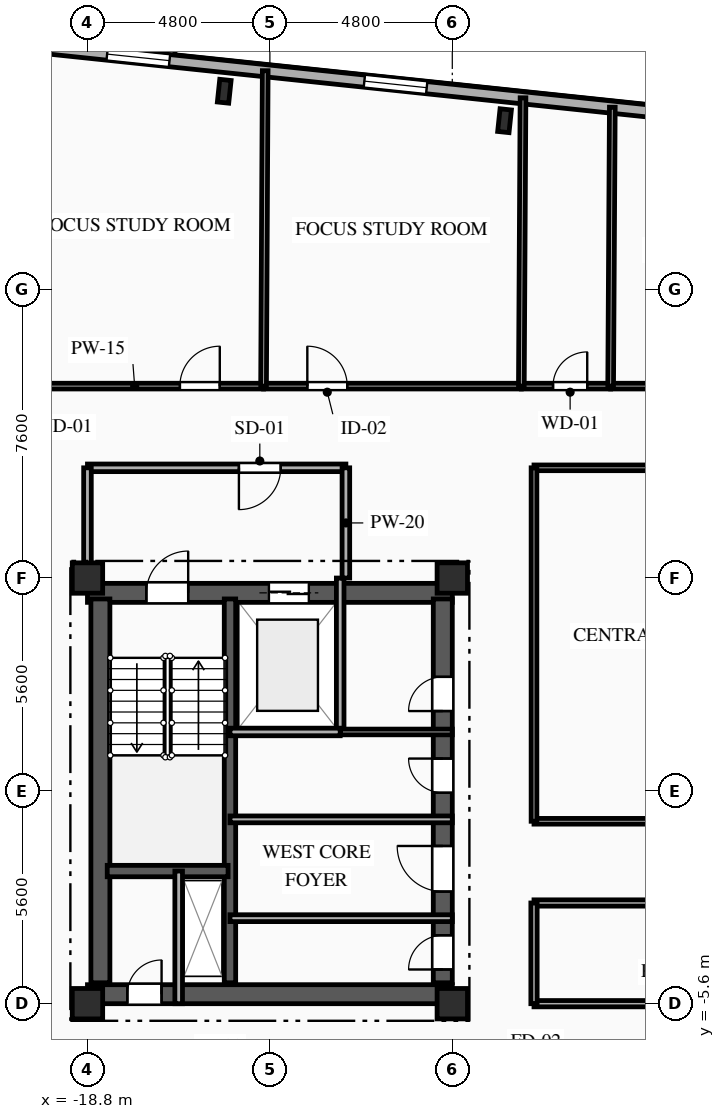
"""IFC4 building model, lengths in metres.
Left out: names, types, materials, properties, quantities, classifications, styles, units other than length and angle.
Written with IfcOpenShell. Run it as: python <this file> out.ifc"""

import sys

from ifc_helpers import new_model, si_unit, direction, frame, frame_2d, origin, origin_2d, place, context, subcontext, project, spatial, rectangle, i_section, extrude, element, fill, save


model = new_model("IFC4")
c1 = context("Model", 3, precision=1e-05, world=origin(), true_north=direction((0.0, 1.0)))
c2 = subcontext(c1, "Body", "Model", "MODEL_VIEW")
j1 = project(units=[si_unit("LENGTHUNIT", "METRE"), si_unit("PLANEANGLEUNIT", "RADIAN")], contexts=[c1])
p1 = place(None, origin())
s1 = spatial("IfcSite", under=j1, at=p1, CompositionType="ELEMENT")
p2 = place(p1, origin())
s2 = spatial("IfcBuilding", under=s1, at=p2, CompositionType="ELEMENT")
p3 = place(p2, frame((0.0, 0.0, 219.85)))
s3 = spatial("IfcBuildingStorey", under=s2, at=p3, CompositionType="ELEMENT", Elevation=219.85)
for number, where, z_axis, x_axis in (
    (1, (-18.8, -5.6, 0.0), (0.0, 0.0, 1.0), (1.0, 0.0, 0.0)),
    (2, (-18.8, 5.6, 0.0), (0.0, 0.0, 1.0), (1.0, 0.0, 0.0)),
    (3, (-9.2, -5.6, 0.0), (0.0, 0.0, 1.0), (1.0, 0.0, 0.0)),
    (4, (-9.2, 5.6, 0.0), (0.0, 0.0, 1.0), (1.0, 0.0, 0.0)),
):
    element("IfcColumn", number, at=place(p3, frame(where, z_axis=z_axis, x_axis=x_axis)), inside=s3, PredefinedType="COLUMN", context=c2, shape_type="SweptSolid", body=[
        extrude(rectangle(XDim=0.8, YDim=0.8, at=origin_2d()), origin(), (0.0, 0.0, 1.0), 3.35),
    ])
for number, where, z_axis, x_axis in (
    (5, (-7.825, 17.634, 0.0), (0.0, 0.0, 1.0), (0.995, -0.105, 0.0)),
    (6, (-15.201, 18.409, 0.0), (0.0, 0.0, 1.0), (0.995, -0.105, 0.0)),
):
    element("IfcColumn", number, at=place(p3, frame(where, z_axis=z_axis, x_axis=x_axis)), inside=s3, PredefinedType="COLUMN", context=c2, shape_type="SweptSolid", body=[
        extrude(i_section(OverallWidth=0.3, OverallDepth=0.6, WebThickness=0.015, FlangeThickness=0.03, FilletRadius=0.027, at=origin_2d()), origin(), (0.0, 0.0, 1.0), 3.35),
    ])
p4 = place(p3, frame((-23.156, 19.898, 0.0), z_axis=(0.0, 0.0, 1.0), x_axis=(0.994522001802, -0.104527450613, 0.0)))
e7 = element("IfcWall", 7, at=p4, inside=s3, PredefinedType="SOLIDWALL", context=c2, shape_type="SweptSolid", body=[
    extrude(rectangle(XDim=45.8, YDim=0.32, at=frame_2d((22.9, 0.0))), origin(), (0.0, 0.0, 1.0), 3.0),
])
p5 = place(p4, frame((4.9, 0.0, 0.85)))
e8 = element("IfcOpeningElement", 8, at=p5, cuts=e7, PredefinedType="OPENING", context=c2, shape_type="SweptSolid", body=[
    extrude(rectangle(XDim=1.65, YDim=1.85, at=frame_2d((0.825, 0.925))), frame((0.0, 0.17, 0.0), z_axis=(0.0, -1.0, 0.0), x_axis=(1.0, 0.0, 0.0)), (0.0, 0.0, 1.0), 0.34),
])
p6 = place(p4, frame((11.706, 0.0, 0.85)))
e9 = element("IfcOpeningElement", 9, at=p6, cuts=e7, PredefinedType="OPENING", context=c2, shape_type="SweptSolid", body=[
    extrude(rectangle(XDim=1.65, YDim=1.85, at=frame_2d((0.825, 0.925))), frame((0.0, 0.17, 0.0), z_axis=(0.0, -1.0, 0.0), x_axis=(1.0, 0.0, 0.0)), (0.0, 0.0, 1.0), 0.34),
])
p7 = place(p4, frame((23.431, 0.0, 0.85)))
e10 = element("IfcOpeningElement", 10, at=p7, cuts=e7, PredefinedType="OPENING", context=c2, shape_type="SweptSolid", body=[
    extrude(rectangle(XDim=1.5, YDim=1.85, at=frame_2d((0.75, 0.925))), frame((0.0, 0.17, 0.0), z_axis=(0.0, -1.0, 0.0), x_axis=(1.0, 0.0, 0.0)), (0.0, 0.0, 1.0), 0.34),
])
p8 = place(p4, frame((34.628, 0.0, 0.85)))
e11 = element("IfcOpeningElement", 11, at=p8, cuts=e7, PredefinedType="OPENING", context=c2, shape_type="SweptSolid", body=[
    extrude(rectangle(XDim=1.65, YDim=1.85, at=frame_2d((0.825, 0.925))), frame((0.0, 0.17, 0.0), z_axis=(0.0, -1.0, 0.0), x_axis=(1.0, 0.0, 0.0)), (0.0, 0.0, 1.0), 0.34),
])
p9 = place(p3, frame((-18.8, 5.21, 0.0), z_axis=(0.0, 0.0, 1.0), x_axis=(1.0, 0.0, 0.0)))
e12 = element("IfcWall", 12, at=p9, inside=s3, PredefinedType="SHEAR", context=c2, shape_type="SweptSolid", body=[
    extrude(rectangle(XDim=9.6, YDim=0.5, at=frame_2d((4.8, 0.0))), origin(), (0.0, 0.0, 1.0), 3.0),
])
p10 = place(p9, frame((1.55, 0.0, 0.0)))
e13 = element("IfcOpeningElement", 13, at=p10, cuts=e12, PredefinedType="OPENING", context=c2, shape_type="SweptSolid", body=[
    extrude(rectangle(XDim=1.1, YDim=2.15, at=frame_2d((0.55, 1.075))), frame((0.0, 0.26, 0.0), z_axis=(0.0, -1.0, 0.0), x_axis=(1.0, 0.0, 0.0)), (0.0, 0.0, 1.0), 0.52),
])
p11 = place(p9, frame((4.775, 0.0, 0.0)))
e14 = element("IfcOpeningElement", 14, at=p11, cuts=e12, PredefinedType="OPENING", context=c2, shape_type="SweptSolid", body=[
    extrude(rectangle(XDim=1.05, YDim=2.1, at=frame_2d((0.525, 1.05))), frame((0.0, 0.26, 0.0), z_axis=(0.0, -1.0, 0.0), x_axis=(1.0, 0.0, 0.0)), (0.0, 0.0, 1.0), 0.52),
])
p12 = place(p3, frame((-18.8, -5.35, 0.0), z_axis=(0.0, 0.0, 1.0), x_axis=(1.0, 0.0, 0.0)))
e15 = element("IfcWall", 15, at=p12, inside=s3, PredefinedType="SHEAR", context=c2, shape_type="SweptSolid", body=[
    extrude(rectangle(XDim=9.6, YDim=0.5, at=frame_2d((4.8, 0.0))), origin(), (0.0, 0.0, 1.0), 3.0),
])
p13 = place(p12, frame((1.05, 0.0, 0.0)))
e16 = element("IfcOpeningElement", 16, at=p13, cuts=e15, PredefinedType="OPENING", context=c2, shape_type="SweptSolid", body=[
    extrude(rectangle(XDim=0.9, YDim=2.1, at=frame_2d((0.45, 1.05))), frame((0.0, 0.26, 0.0), z_axis=(0.0, -1.0, 0.0), x_axis=(1.0, 0.0, 0.0)), (0.0, 0.0, 1.0), 0.52),
])
p14 = place(p3, frame((-18.46, -5.05, 0.0), z_axis=(0.0, 0.0, 1.0), x_axis=(0.0, 1.0, 0.0)))
e17 = element("IfcWall", 17, at=p14, inside=s3, PredefinedType="SHEAR", context=c2, shape_type="SweptSolid", body=[
    extrude(rectangle(XDim=10.1, YDim=0.5, at=frame_2d((5.05, 0.0))), origin(), (0.0, 0.0, 1.0), 3.0),
])
p15 = place(p3, frame((-9.45, -5.05, 0.0), z_axis=(0.0, 0.0, 1.0), x_axis=(0.0, 1.0, 0.0)))
e18 = element("IfcWall", 18, at=p15, inside=s3, PredefinedType="SHEAR", context=c2, shape_type="SweptSolid", body=[
    extrude(rectangle(XDim=10.1, YDim=0.5, at=frame_2d((5.05, 0.0))), origin(), (0.0, 0.0, 1.0), 3.0),
])
p16 = place(p15, frame((7.15, 0.0, 0.0)))
e19 = element("IfcOpeningElement", 19, at=p16, cuts=e18, PredefinedType="OPENING", context=c2, shape_type="SweptSolid", body=[
    extrude(rectangle(XDim=0.9, YDim=2.1, at=frame_2d((0.45, 1.05))), frame((0.0, 0.26, 0.0), z_axis=(0.0, -1.0, 0.0), x_axis=(1.0, 0.0, 0.0)), (0.0, 0.0, 1.0), 0.52),
])
p17 = place(p15, frame((2.4, 0.0, 0.0)))
e20 = element("IfcOpeningElement", 20, at=p17, cuts=e18, PredefinedType="OPENING", context=c2, shape_type="SweptSolid", body=[
    extrude(rectangle(XDim=1.2, YDim=2.15, at=frame_2d((0.6, 1.075))), frame((0.0, 0.26, 0.0), z_axis=(0.0, -1.0, 0.0), x_axis=(1.0, 0.0, 0.0)), (0.0, 0.0, 1.0), 0.52),
])
p18 = place(p15, frame((0.35, 0.0, 0.0)))
e21 = element("IfcOpeningElement", 21, at=p18, cuts=e18, PredefinedType="OPENING", context=c2, shape_type="SweptSolid", body=[
    extrude(rectangle(XDim=0.9, YDim=2.1, at=frame_2d((0.45, 1.05))), frame((0.0, 0.26, 0.0), z_axis=(0.0, -1.0, 0.0), x_axis=(1.0, 0.0, 0.0)), (0.0, 0.0, 1.0), 0.52),
])
p19 = place(p15, frame((5.0, 0.0, 0.0)))
e22 = element("IfcOpeningElement", 22, at=p19, cuts=e18, PredefinedType="OPENING", context=c2, shape_type="SweptSolid", body=[
    extrude(rectangle(XDim=0.9, YDim=2.1, at=frame_2d((0.45, 1.05))), frame((0.0, 0.26, 0.0), z_axis=(0.0, -1.0, 0.0), x_axis=(1.0, 0.0, 0.0)), (0.0, 0.0, 1.0), 0.52),
])
p20 = place(p3, frame((-15.05, -5.05, 0.0), z_axis=(0.0, 0.0, 1.0), x_axis=(0.0, 1.0, 0.0)))
e23 = element("IfcWall", 23, at=p20, inside=s3, PredefinedType="SHEAR", context=c2, shape_type="SweptSolid", body=[
    extrude(rectangle(XDim=10.1, YDim=0.3, at=frame_2d((5.05, 0.0))), origin(), (0.0, 0.0, 1.0), 3.0),
])
p21 = place(p3, frame((-18.28, -2.11, 0.0), z_axis=(0.0, 0.0, 1.0), x_axis=(1.0, 0.0, 0.0)))
e24 = element("IfcWall", 24, at=p21, inside=s3, PredefinedType="SHEAR", context=c2, shape_type="SweptSolid", body=[
    extrude(rectangle(XDim=3.18, YDim=0.3, at=frame_2d((1.59, 0.0))), origin(), (0.0, 0.0, 1.0), 3.0),
])
p22 = place(p3, frame((-16.4, -5.6, 0.0), z_axis=(0.0, 0.0, 1.0), x_axis=(0.0, 1.0, 0.0)))
e25 = element("IfcWall", 25, at=p22, inside=s3, PredefinedType="PARTITIONING", context=c2, shape_type="SweptSolid", body=[
    extrude(rectangle(XDim=3.49, YDim=0.2, at=frame_2d((1.745, 0.0))), origin(), (0.0, 0.0, 1.0), 3.0),
])
p23 = place(p3, frame((-12.15, 1.55, 0.0), z_axis=(0.0, 0.0, 1.0), x_axis=(0.0, 1.0, 0.0)))
e26 = element("IfcWall", 26, at=p23, inside=s3, PredefinedType="PARTITIONING", context=c2, shape_type="SweptSolid", body=[
    extrude(rectangle(XDim=4.05, YDim=0.2, at=frame_2d((2.025, 0.0))), origin(), (0.0, 0.0, 1.0), 3.0),
])
p24 = place(p3, frame((-12.0, 8.5, 0.0), z_axis=(0.0, 0.0, 1.0), x_axis=(-1.0, 0.0, 0.0)))
e27 = element("IfcWall", 27, at=p24, inside=s3, PredefinedType="PARTITIONING", context=c2, shape_type="SweptSolid", body=[
    extrude(rectangle(XDim=6.8, YDim=0.2, at=frame_2d((3.4, 0.0))), origin(), (0.0, 0.0, 1.0), 3.0),
])
p25 = place(p24, frame((1.715, 0.0, 0.0)))
e28 = element("IfcOpeningElement", 28, at=p25, cuts=e27, PredefinedType="OPENING", context=c2, shape_type="SweptSolid", body=[
    extrude(rectangle(XDim=1.1, YDim=2.15, at=frame_2d((0.55, 1.075))), frame((0.0, 0.11, 0.0), z_axis=(0.0, -1.0, 0.0), x_axis=(1.0, 0.0, 0.0)), (0.0, 0.0, 1.0), 0.22),
])
p26 = place(p3, frame((-18.8, 8.5, 0.0), z_axis=(0.0, 0.0, 1.0), x_axis=(0.0, -1.0, 0.0)))
e29 = element("IfcWall", 29, at=p26, inside=s3, PredefinedType="PARTITIONING", context=c2, shape_type="SweptSolid", body=[
    extrude(rectangle(XDim=2.9, YDim=0.2, at=frame_2d((1.45, 0.0))), origin(), (0.0, 0.0, 1.0), 2.625),
])
p27 = place(p3, frame((-12.0, 5.6, 0.0), z_axis=(0.0, 0.0, 1.0), x_axis=(0.0, 1.0, 0.0)))
e30 = element("IfcWall", 30, at=p27, inside=s3, PredefinedType="PARTITIONING", context=c2, shape_type="SweptSolid", body=[
    extrude(rectangle(XDim=2.9, YDim=0.2, at=frame_2d((1.45, 0.0))), origin(), (0.0, 0.0, 1.0), 3.0),
])
p28 = place(p3, frame((-12.15, 1.55, 0.0), z_axis=(0.0, 0.0, 1.0), x_axis=(1.0, 0.0, 0.0)))
e31 = element("IfcWall", 31, at=p28, inside=s3, PredefinedType="PARTITIONING", context=c2, shape_type="SweptSolid", body=[
    extrude(rectangle(XDim=2.95, YDim=0.15, at=frame_2d((1.475, 0.0))), origin(), (0.0, 0.0, 1.0), 3.0),
])
p29 = place(p3, frame((-15.05, -3.35, 0.0), z_axis=(0.0, 0.0, 1.0), x_axis=(1.0, 0.0, 0.0)))
e32 = element("IfcWall", 32, at=p29, inside=s3, PredefinedType="PARTITIONING", context=c2, shape_type="SweptSolid", body=[
    extrude(rectangle(XDim=5.85, YDim=0.18, at=frame_2d((2.925, 0.0))), origin(), (0.0, 0.0, 1.0), 2.715),
])
p30 = place(p3, frame((-9.2, -0.75, 0.0), z_axis=(0.0, 0.0, 1.0), x_axis=(-1.0, 0.0, 0.0)))
e33 = element("IfcWall", 33, at=p30, inside=s3, PredefinedType="PARTITIONING", context=c2, shape_type="SweptSolid", body=[
    extrude(rectangle(XDim=5.85, YDim=0.18, at=frame_2d((2.925, 0.0))), origin(), (0.0, 0.0, 1.0), 3.0),
])
p31 = place(p3, frame((-20.95, 10.65, 0.0), z_axis=(0.0, 0.0, 1.0), x_axis=(1.0, 0.0, 0.0)))
e34 = element("IfcWall", 34, at=p31, inside=s3, PredefinedType="PARTITIONING", context=c2, shape_type="SweptSolid", body=[
    extrude(rectangle(XDim=6.783, YDim=0.15, at=frame_2d((3.392, 0.0))), origin(), (0.0, 0.0, 1.0), 3.0),
])
p32 = place(p31, frame((4.582, 0.0, 0.0)))
e35 = element("IfcOpeningElement", 35, at=p32, cuts=e34, PredefinedType="OPENING", context=c2, shape_type="SweptSolid", body=[
    extrude(rectangle(XDim=1.05, YDim=2.15, at=frame_2d((0.525, 1.075))), frame((0.0, 0.085, 0.0), z_axis=(0.0, -1.0, 0.0), x_axis=(1.0, 0.0, 0.0)), (0.0, 0.0, 1.0), 0.17),
])
p33 = place(p3, frame((-14.167, 10.65, 0.0), z_axis=(0.0, 0.0, 1.0), x_axis=(1.0, 0.0, 0.0)))
e36 = element("IfcWall", 36, at=p33, inside=s3, PredefinedType="PARTITIONING", context=c2, shape_type="SweptSolid", body=[
    extrude(rectangle(XDim=6.783, YDim=0.15, at=frame_2d((3.392, 0.0))), origin(), (0.0, 0.0, 1.0), 3.0),
])
p34 = place(p33, frame((1.152, 0.0, 0.0)))
e37 = element("IfcOpeningElement", 37, at=p34, cuts=e36, PredefinedType="OPENING", context=c2, shape_type="SweptSolid", body=[
    extrude(rectangle(XDim=1.05, YDim=2.15, at=frame_2d((0.525, 1.075))), frame((0.0, 0.085, 0.0), z_axis=(0.0, -1.0, 0.0), x_axis=(1.0, 0.0, 0.0)), (0.0, 0.0, 1.0), 0.17),
])
p35 = place(p3, frame((-7.383, 10.65, 0.0), z_axis=(0.0, 0.0, 1.0), x_axis=(1.0, 0.0, 0.0)))
e38 = element("IfcWall", 38, at=p35, inside=s3, PredefinedType="PLUMBINGWALL", context=c2, shape_type="SweptSolid", body=[
    extrude(rectangle(XDim=2.35, YDim=0.15, at=frame_2d((1.175, 0.0))), origin(), (0.0, 0.0, 1.0), 3.0),
])
p36 = place(p35, frame((0.834, 0.0, 0.0)))
e39 = element("IfcOpeningElement", 39, at=p36, cuts=e38, PredefinedType="OPENING", context=c2, shape_type="SweptSolid", body=[
    extrude(rectangle(XDim=0.9, YDim=2.1, at=frame_2d((0.45, 1.05))), frame((0.0, 0.085, 0.0), z_axis=(0.0, -1.0, 0.0), x_axis=(1.0, 0.0, 0.0)), (0.0, 0.0, 1.0), 0.17),
])
p37 = place(p3, frame((-5.033, 10.65, 0.0), z_axis=(0.0, 0.0, 1.0), x_axis=(1.0, 0.0, 0.0)))
e40 = element("IfcWall", 40, at=p37, inside=s3, PredefinedType="PARTITIONING", context=c2, shape_type="SweptSolid", body=[
    extrude(rectangle(XDim=5.033, YDim=0.15, at=frame_2d((2.517, 0.0))), origin(), (0.0, 0.0, 1.0), 3.0),
])
p38 = place(p3, frame((0.0, 8.5, 0.0), z_axis=(0.0, 0.0, 1.0), x_axis=(-1.0, 0.0, 0.0)))
e41 = element("IfcWall", 41, at=p38, inside=s3, PredefinedType="PARTITIONING", context=c2, shape_type="SweptSolid", body=[
    extrude(rectangle(XDim=7.05, YDim=0.15, at=frame_2d((3.525, 0.0))), origin(), (0.0, 0.0, 1.0), 3.0),
])
p39 = place(p3, frame((-7.05, -5.6, 0.0), z_axis=(0.0, 0.0, 1.0), x_axis=(1.0, 0.0, 0.0)))
e42 = element("IfcWall", 42, at=p39, inside=s3, PredefinedType="PARTITIONING", context=c2, shape_type="SweptSolid", body=[
    extrude(rectangle(XDim=7.05, YDim=0.165, at=frame_2d((3.525, 0.0))), origin(), (0.0, 0.0, 1.0), 2.485),
])
p40 = place(p3, frame((-7.05, -0.8, 0.0), z_axis=(0.0, 0.0, 1.0), x_axis=(1.0, 0.0, 0.0)))
e43 = element("IfcWall", 43, at=p40, inside=s3, PredefinedType="PARTITIONING", context=c2, shape_type="SweptSolid", body=[
    extrude(rectangle(XDim=14.1, YDim=0.15, at=frame_2d((7.05, 0.0))), origin(), (0.0, 0.0, 1.0), 3.0),
])
p41 = place(p40, frame((6.525, 0.0, 0.0)))
e44 = element("IfcOpeningElement", 44, at=p41, cuts=e43, PredefinedType="OPENING", context=c2, shape_type="SweptSolid", body=[
    extrude(rectangle(XDim=1.05, YDim=2.15, at=frame_2d((0.525, 1.075))), frame((0.0, 0.085, 0.0), z_axis=(0.0, -1.0, 0.0), x_axis=(1.0, 0.0, 0.0)), (0.0, 0.0, 1.0), 0.17),
])
p42 = place(p3, frame((7.05, -2.95, 0.0), z_axis=(0.0, 0.0, 1.0), x_axis=(-1.0, 0.0, 0.0)))
e45 = element("IfcWall", 45, at=p42, inside=s3, PredefinedType="PARTITIONING", context=c2, shape_type="SweptSolid", body=[
    extrude(rectangle(XDim=14.1, YDim=0.165, at=frame_2d((7.05, 0.0))), origin(), (0.0, 0.0, 1.0), 3.0),
])
p43 = place(p42, frame((6.475, 0.0, 0.0)))
e46 = element("IfcOpeningElement", 46, at=p43, cuts=e45, PredefinedType="OPENING", context=c2, shape_type="SweptSolid", body=[
    extrude(rectangle(XDim=1.15, YDim=2.15, at=frame_2d((0.575, 1.075))), frame((0.0, 0.093, 0.0), z_axis=(0.0, -1.0, 0.0), x_axis=(1.0, 0.0, 0.0)), (0.0, 0.0, 1.0), 0.185),
])
p44 = place(p3, frame((-7.05, 8.5, 0.0), z_axis=(0.0, 0.0, 1.0), x_axis=(0.0, -1.0, 0.0)))
e47 = element("IfcWall", 47, at=p44, inside=s3, PredefinedType="PARTITIONING", context=c2, shape_type="SweptSolid", body=[
    extrude(rectangle(XDim=9.3, YDim=0.15, at=frame_2d((4.65, 0.0))), origin(), (0.0, 0.0, 1.0), 3.0),
])
p45 = place(p3, frame((-7.05, -2.95, 0.0), z_axis=(0.0, 0.0, 1.0), x_axis=(0.0, -1.0, 0.0)))
e48 = element("IfcWall", 48, at=p45, inside=s3, PredefinedType="PARTITIONING", context=c2, shape_type="SweptSolid", body=[
    extrude(rectangle(XDim=2.65, YDim=0.165, at=frame_2d((1.325, 0.0))), origin(), (0.0, 0.0, 1.0), 3.0),
])
p46 = place(p3, frame((-14.123, 18.949, 0.0), z_axis=(0.0, 0.0, 1.0), x_axis=(-0.005295133602, -0.999985980682, 0.0)))
e49 = element("IfcWall", 49, at=p46, inside=s3, PredefinedType="PARTITIONING", context=c2, shape_type="SweptSolid", body=[
    extrude(rectangle(XDim=8.299, YDim=0.15, at=frame_2d((4.149, 0.0))), origin(), (0.0, 0.0, 1.0), 3.0),
])
p47 = place(p3, frame((-7.339, 18.236, 0.0), z_axis=(0.0, 0.0, 1.0), x_axis=(-0.005792713287, -0.999983222096, 0.0)))
e50 = element("IfcWall", 50, at=p47, inside=s3, PredefinedType="PLUMBINGWALL", context=c2, shape_type="SweptSolid", body=[
    extrude(rectangle(XDim=7.586, YDim=0.15, at=frame_2d((3.793, 0.0))), origin(), (0.0, 0.0, 1.0), 3.0),
])
p48 = place(p3, frame((-4.989, 17.989, 0.0), z_axis=(0.0, 0.0, 1.0), x_axis=(-0.005987717415, -0.999982073459, 0.0)))
e51 = element("IfcWall", 51, at=p48, inside=s3, PredefinedType="PLUMBINGWALL", context=c2, shape_type="SweptSolid", body=[
    extrude(rectangle(XDim=7.339, YDim=0.15, at=frame_2d((3.67, 0.0))), origin(), (0.0, 0.0, 1.0), 3.0),
])
p49 = place(p3, frame((-15.05, 1.55, 0.0), z_axis=(0.0, 0.0, 1.0), x_axis=(1.0, 0.0, 0.0)))
e52 = element("IfcWall", 52, at=p49, inside=s3, PredefinedType="PARTITIONING", context=c2, shape_type="SweptSolid", body=[
    extrude(rectangle(XDim=2.9, YDim=0.2, at=frame_2d((1.45, 0.0))), origin(), (0.0, 0.0, 1.0), 3.0),
])
p50 = place(p5, origin())
e53 = element("IfcWindow", 53, at=p50, inside=s3, PartitioningType="SINGLE_PANEL", PredefinedType="WINDOW", context=c2, shape_type="SweptSolid", body=[
    extrude(rectangle(XDim=1.65, YDim=1.85, at=frame_2d((0.825, 0.925))), frame((0.0, 0.03, 0.0), z_axis=(0.0, -1.0, 0.0), x_axis=(1.0, 0.0, 0.0)), (0.0, 0.0, 1.0), 0.06),
])
fill(e8, e53)
p51 = place(p6, origin())
e54 = element("IfcWindow", 54, at=p51, inside=s3, PartitioningType="SINGLE_PANEL", PredefinedType="WINDOW", context=c2, shape_type="SweptSolid", body=[
    extrude(rectangle(XDim=1.65, YDim=1.85, at=frame_2d((0.825, 0.925))), frame((0.0, 0.03, 0.0), z_axis=(0.0, -1.0, 0.0), x_axis=(1.0, 0.0, 0.0)), (0.0, 0.0, 1.0), 0.06),
])
fill(e9, e54)
p52 = place(p10, origin())
e55 = element("IfcDoor", 55, at=p52, inside=s3, OperationType="SINGLE_SWING_RIGHT", PredefinedType="DOOR", context=c2, shape_type="SweptSolid", body=[
    extrude(rectangle(XDim=1.1, YDim=2.15, at=frame_2d((0.55, 1.075))), frame((0.0, 0.025, 0.0), z_axis=(0.0, -1.0, 0.0), x_axis=(1.0, 0.0, 0.0)), (0.0, 0.0, 1.0), 0.05),
])
fill(e13, e55)
p53 = place(p11, origin())
e56 = element("IfcDoor", 56, at=p53, inside=s3, OperationType="DOUBLE_DOOR_SLIDING", PredefinedType="DOOR", context=c2, shape_type="SweptSolid", body=[
    extrude(rectangle(XDim=1.05, YDim=2.1, at=frame_2d((0.525, 1.05))), frame((0.0, 0.025, 0.0), z_axis=(0.0, -1.0, 0.0), x_axis=(1.0, 0.0, 0.0)), (0.0, 0.0, 1.0), 0.05),
])
fill(e14, e56)
p54 = place(p13, origin())
e57 = element("IfcDoor", 57, at=p54, inside=s3, OperationType="SINGLE_SWING_RIGHT", PredefinedType="DOOR", context=c2, shape_type="SweptSolid", body=[
    extrude(rectangle(XDim=0.9, YDim=2.1, at=frame_2d((0.45, 1.05))), frame((0.0, 0.025, 0.0), z_axis=(0.0, -1.0, 0.0), x_axis=(1.0, 0.0, 0.0)), (0.0, 0.0, 1.0), 0.05),
])
fill(e16, e57)
p55 = place(p25, origin())
e58 = element("IfcDoor", 58, at=p55, inside=s3, OperationType="SINGLE_SWING_RIGHT", PredefinedType="DOOR", context=c2, shape_type="SweptSolid", body=[
    extrude(rectangle(XDim=1.1, YDim=2.15, at=frame_2d((0.55, 1.075))), frame((0.0, 0.025, 0.0), z_axis=(0.0, -1.0, 0.0), x_axis=(1.0, 0.0, 0.0)), (0.0, 0.0, 1.0), 0.05),
])
fill(e28, e58)
p56 = place(p16, origin())
e59 = element("IfcDoor", 59, at=p56, inside=s3, OperationType="SINGLE_SWING_LEFT", PredefinedType="DOOR", context=c2, shape_type="SweptSolid", body=[
    extrude(rectangle(XDim=0.9, YDim=2.1, at=frame_2d((0.45, 1.05))), frame((0.0, 0.025, 0.0), z_axis=(0.0, -1.0, 0.0), x_axis=(1.0, 0.0, 0.0)), (0.0, 0.0, 1.0), 0.05),
])
fill(e19, e59)
p57 = place(p17, origin())
e60 = element("IfcDoor", 60, at=p57, inside=s3, OperationType="SINGLE_SWING_RIGHT", PredefinedType="DOOR", context=c2, shape_type="SweptSolid", body=[
    extrude(rectangle(XDim=1.2, YDim=2.15, at=frame_2d((0.6, 1.075))), frame((0.0, 0.025, 0.0), z_axis=(0.0, -1.0, 0.0), x_axis=(1.0, 0.0, 0.0)), (0.0, 0.0, 1.0), 0.05),
])
fill(e20, e60)
p58 = place(p18, origin())
e61 = element("IfcDoor", 61, at=p58, inside=s3, OperationType="SINGLE_SWING_LEFT", PredefinedType="DOOR", context=c2, shape_type="SweptSolid", body=[
    extrude(rectangle(XDim=0.9, YDim=2.1, at=frame_2d((0.45, 1.05))), frame((0.0, 0.025, 0.0), z_axis=(0.0, -1.0, 0.0), x_axis=(1.0, 0.0, 0.0)), (0.0, 0.0, 1.0), 0.05),
])
fill(e21, e61)
p59 = place(p19, origin())
e62 = element("IfcDoor", 62, at=p59, inside=s3, OperationType="SINGLE_SWING_RIGHT", PredefinedType="DOOR", context=c2, shape_type="SweptSolid", body=[
    extrude(rectangle(XDim=0.9, YDim=2.1, at=frame_2d((0.45, 1.05))), frame((0.0, 0.025, 0.0), z_axis=(0.0, -1.0, 0.0), x_axis=(1.0, 0.0, 0.0)), (0.0, 0.0, 1.0), 0.05),
])
fill(e22, e62)
p60 = place(p32, origin())
e63 = element("IfcDoor", 63, at=p60, inside=s3, OperationType="SINGLE_SWING_RIGHT", PredefinedType="DOOR", context=c2, shape_type="SweptSolid", body=[
    extrude(rectangle(XDim=1.05, YDim=2.15, at=frame_2d((0.525, 1.075))), frame((0.0, 0.025, 0.0), z_axis=(0.0, -1.0, 0.0), x_axis=(1.0, 0.0, 0.0)), (0.0, 0.0, 1.0), 0.05),
])
fill(e35, e63)
p61 = place(p34, origin())
e64 = element("IfcDoor", 64, at=p61, inside=s3, OperationType="SINGLE_SWING_LEFT", PredefinedType="DOOR", context=c2, shape_type="SweptSolid", body=[
    extrude(rectangle(XDim=1.05, YDim=2.15, at=frame_2d((0.525, 1.075))), frame((0.0, 0.025, 0.0), z_axis=(0.0, -1.0, 0.0), x_axis=(1.0, 0.0, 0.0)), (0.0, 0.0, 1.0), 0.05),
])
fill(e37, e64)
p62 = place(p36, origin())
e65 = element("IfcDoor", 65, at=p62, inside=s3, OperationType="SINGLE_SWING_RIGHT", PredefinedType="DOOR", context=c2, shape_type="SweptSolid", body=[
    extrude(rectangle(XDim=0.9, YDim=2.1, at=frame_2d((0.45, 1.05))), frame((0.0, 0.025, 0.0), z_axis=(0.0, -1.0, 0.0), x_axis=(1.0, 0.0, 0.0)), (0.0, 0.0, 1.0), 0.05),
])
fill(e39, e65)
save(model, sys.argv[1])
